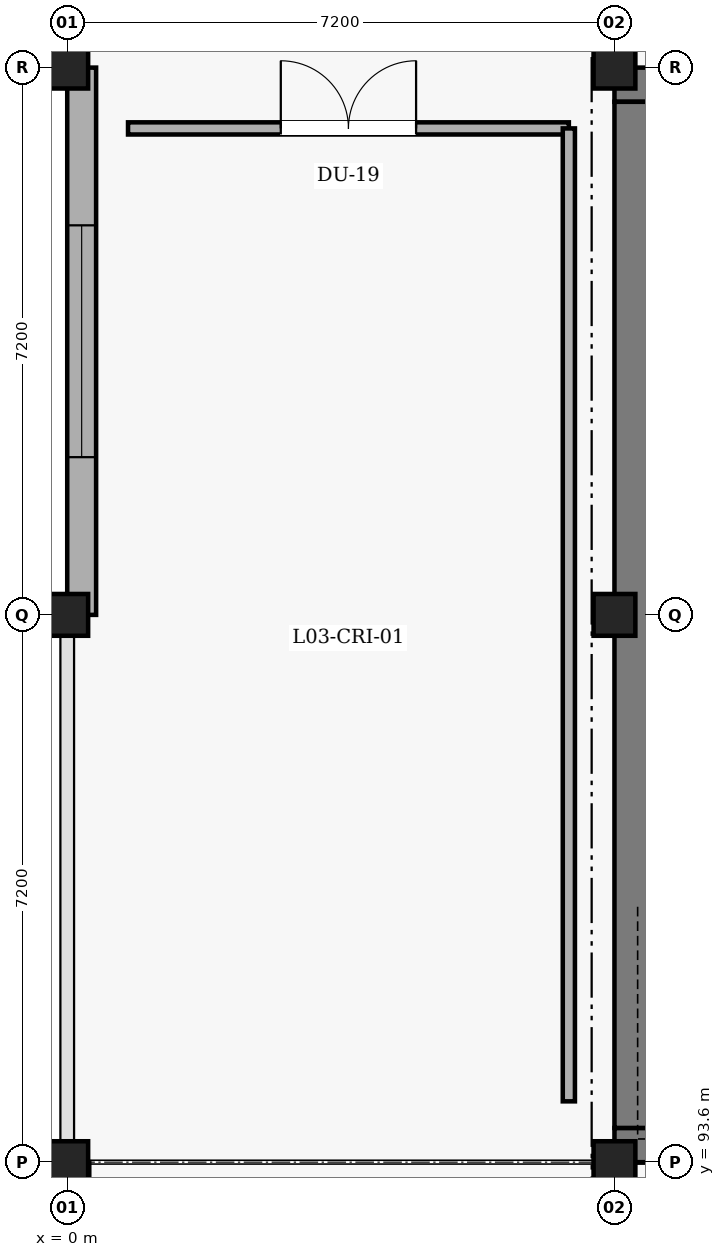
"""IFC4 building model, lengths in metres.
Left out: names, types, materials, properties, quantities, classifications, styles, units other than length and angle.
Written with IfcOpenShell. Run it as: python <this file> out.ifc"""

import sys

from ifc_helpers import new_model, si_unit, direction, frame, frame_2d, origin, origin_2d, place, context, subcontext, project, spatial, rectangle, extrude, element, fill, save


model = new_model("IFC4")
c1 = context("Model", 3, precision=1e-05, world=origin(), true_north=direction((0.0, 1.0)))
c2 = subcontext(c1, "Body", "Model", "MODEL_VIEW")
j1 = project(units=[si_unit("LENGTHUNIT", "METRE"), si_unit("PLANEANGLEUNIT", "RADIAN")], contexts=[c1])
p1 = place(None, origin())
s1 = spatial("IfcSite", under=j1, at=p1, CompositionType="ELEMENT")
p2 = place(p1, origin())
s2 = spatial("IfcBuilding", under=s1, at=p2, CompositionType="ELEMENT")
p3 = place(p2, frame((0.0, 0.0, 13.8)))
s3 = spatial("IfcBuildingStorey", under=s2, at=p3, CompositionType="ELEMENT", Elevation=13.8)
p4 = place(p3, frame((7.2, 107.775, 0.0), z_axis=(0.0, 0.0, 1.0), x_axis=(1.0, 0.0, 0.0)))
e1 = element("IfcWall", 1, at=p4, inside=s3, PredefinedType="SHEAR", context=c2, shape_type="SweptSolid", body=[
    extrude(rectangle(XDim=14.4, YDim=0.45, at=frame_2d((7.2, 0.0))), origin(), (0.0, 0.0, 1.0), 4.2),
])
p5 = place(p4, frame((2.4, 0.0, 0.0)))
e2 = element("IfcOpeningElement", 2, at=p5, cuts=e1, PredefinedType="OPENING", context=c2, shape_type="SweptSolid", body=[
    extrude(rectangle(XDim=1.25, YDim=2.2, at=frame_2d((0.625, 1.1))), frame((0.0, 0.235, 0.0), z_axis=(0.0, -1.0, 0.0), x_axis=(1.0, 0.0, 0.0)), (0.0, 0.0, 1.0), 0.47),
])
p6 = place(p3, frame((21.6, 93.825, 0.0), z_axis=(0.0, 0.0, 1.0), x_axis=(-1.0, 0.0, 0.0)))
e3 = element("IfcWall", 3, at=p6, inside=s3, PredefinedType="SHEAR", context=c2, shape_type="SweptSolid", body=[
    extrude(rectangle(XDim=14.4, YDim=0.45, at=frame_2d((7.2, 0.0))), origin(), (0.0, 0.0, 1.0), 4.2),
])
p7 = place(p3, frame((7.425, 94.05, 0.0), z_axis=(0.0, 0.0, 1.0), x_axis=(0.0, 1.0, 0.0)))
e4 = element("IfcWall", 4, at=p7, inside=s3, PredefinedType="SHEAR", context=c2, shape_type="SweptSolid", body=[
    extrude(rectangle(XDim=13.5, YDim=0.45, at=frame_2d((6.75, 0.0))), origin(), (0.0, 0.0, 1.0), 4.2),
])
for number, where, z_axis, x_axis in (
    (5, (0.0, 93.6, 0.0), (0.0, 0.0, 1.0), (0.0, 1.0, 0.0)),
    (6, (0.0, 100.8, 0.0), (0.0, 0.0, 1.0), (1.0, 0.0, 0.0)),
    (7, (0.0, 108.0, 0.0), (0.0, 0.0, 1.0), (1.0, 0.0, 0.0)),
    (8, (7.2, 93.6, 0.0), (0.0, 0.0, 1.0), (1.0, 0.0, 0.0)),
    (9, (7.2, 100.8, 0.0), (0.0, 0.0, 1.0), (1.0, 0.0, 0.0)),
    (10, (7.2, 108.0, 0.0), (0.0, 0.0, 1.0), (1.0, 0.0, 0.0)),
):
    element("IfcColumn", number, at=place(p3, frame(where, z_axis=z_axis, x_axis=x_axis)), inside=s3, PredefinedType="COLUMN", context=c2, shape_type="SweptSolid", body=[
        extrude(rectangle(XDim=0.55, YDim=0.55, at=origin_2d()), origin(), (0.0, 0.0, 1.0), 3.9),
    ])
p8 = place(p3, frame((0.145, 86.4, 0.0), z_axis=(0.0, 0.0, 1.0), x_axis=(0.0, 1.0, 0.0)))
e11 = element("IfcWall", 11, at=p8, inside=s3, PredefinedType="SOLIDWALL", context=c2, shape_type="SweptSolid", body=[
    extrude(rectangle(XDim=7.2, YDim=0.29, at=frame_2d((3.6, 0.0))), origin(), (0.0, 0.0, 1.0), 3.68),
])
p9 = place(p8, frame((2.125, 0.0, 0.9)))
e12 = element("IfcOpeningElement", 12, at=p9, cuts=e11, PredefinedType="OPENING", context=c2, shape_type="SweptSolid", body=[
    extrude(rectangle(XDim=2.95, YDim=1.6, at=frame_2d((1.475, 0.8))), frame((0.0, 0.155, 0.0), z_axis=(0.0, -1.0, 0.0), x_axis=(1.0, 0.0, 0.0)), (0.0, 0.0, 1.0), 0.31),
])
p10 = place(p3, frame((0.19, 100.8, 0.0), z_axis=(0.0, 0.0, 1.0), x_axis=(0.0, 1.0, 0.0)))
e13 = element("IfcWall", 13, at=p10, inside=s3, PredefinedType="SOLIDWALL", context=c2, shape_type="SweptSolid", body=[
    extrude(rectangle(XDim=7.2, YDim=0.38, at=frame_2d((3.6, 0.0))), origin(), (0.0, 0.0, 1.0), 3.6),
])
p11 = place(p10, frame((2.075, 0.0, 0.9)))
e14 = element("IfcOpeningElement", 14, at=p11, cuts=e13, PredefinedType="OPENING", context=c2, shape_type="SweptSolid", body=[
    extrude(rectangle(XDim=3.05, YDim=1.65, at=frame_2d((1.525, 0.825))), frame((0.0, 0.2, 0.0), z_axis=(0.0, -1.0, 0.0), x_axis=(1.0, 0.0, 0.0)), (0.0, 0.0, 1.0), 0.4),
])
p12 = place(p3, frame((0.8, 107.2, 0.0), z_axis=(0.0, 0.0, 1.0), x_axis=(1.0, 0.0, 0.0)))
e15 = element("IfcWall", 15, at=p12, inside=s3, PredefinedType="PARTITIONING", context=c2, shape_type="SweptSolid", body=[
    extrude(rectangle(XDim=5.8, YDim=0.16, at=frame_2d((2.9, 0.0))), origin(), (0.0, 0.0, 1.0), 3.85),
])
p13 = place(p12, frame((2.01, 0.0, 0.0)))
e16 = element("IfcOpeningElement", 16, at=p13, cuts=e15, PredefinedType="OPENING", context=c2, shape_type="SweptSolid", body=[
    extrude(rectangle(XDim=1.78, YDim=2.28, at=frame_2d((0.89, 1.14))), frame((0.0, 0.09, 0.0), z_axis=(0.0, -1.0, 0.0), x_axis=(1.0, 0.0, 0.0)), (0.0, 0.0, 1.0), 0.18),
])
p14 = place(p3, frame((6.6, 107.2, 0.0), z_axis=(0.0, 0.0, 1.0), x_axis=(0.0, -1.0, 0.0)))
e17 = element("IfcWall", 17, at=p14, inside=s3, PredefinedType="PARTITIONING", context=c2, shape_type="SweptSolid", body=[
    extrude(rectangle(XDim=12.8, YDim=0.16, at=frame_2d((6.4, 0.0))), origin(), (0.0, 0.0, 1.0), 3.45),
])
p15 = place(p11, origin())
e18 = element("IfcWindow", 18, at=p15, inside=s3, PartitioningType="SINGLE_PANEL", PredefinedType="WINDOW", context=c2, shape_type="SweptSolid", body=[
    extrude(rectangle(XDim=3.05, YDim=1.65, at=frame_2d((1.525, 0.825))), frame((0.0, 0.03, 0.0), z_axis=(0.0, -1.0, 0.0), x_axis=(1.0, 0.0, 0.0)), (0.0, 0.0, 1.0), 0.06),
])
fill(e14, e18)
p16 = place(p13, origin())
e19 = element("IfcDoor", 19, at=p16, inside=s3, OperationType="DOUBLE_DOOR_SINGLE_SWING", PredefinedType="DOOR", context=c2, shape_type="SweptSolid", body=[
    extrude(rectangle(XDim=1.78, YDim=2.28, at=frame_2d((0.89, 1.14))), frame((0.0, 0.025, 0.0), z_axis=(0.0, -1.0, 0.0), x_axis=(1.0, 0.0, 0.0)), (0.0, 0.0, 1.0), 0.05),
])
fill(e16, e19)
save(model, sys.argv[1])
